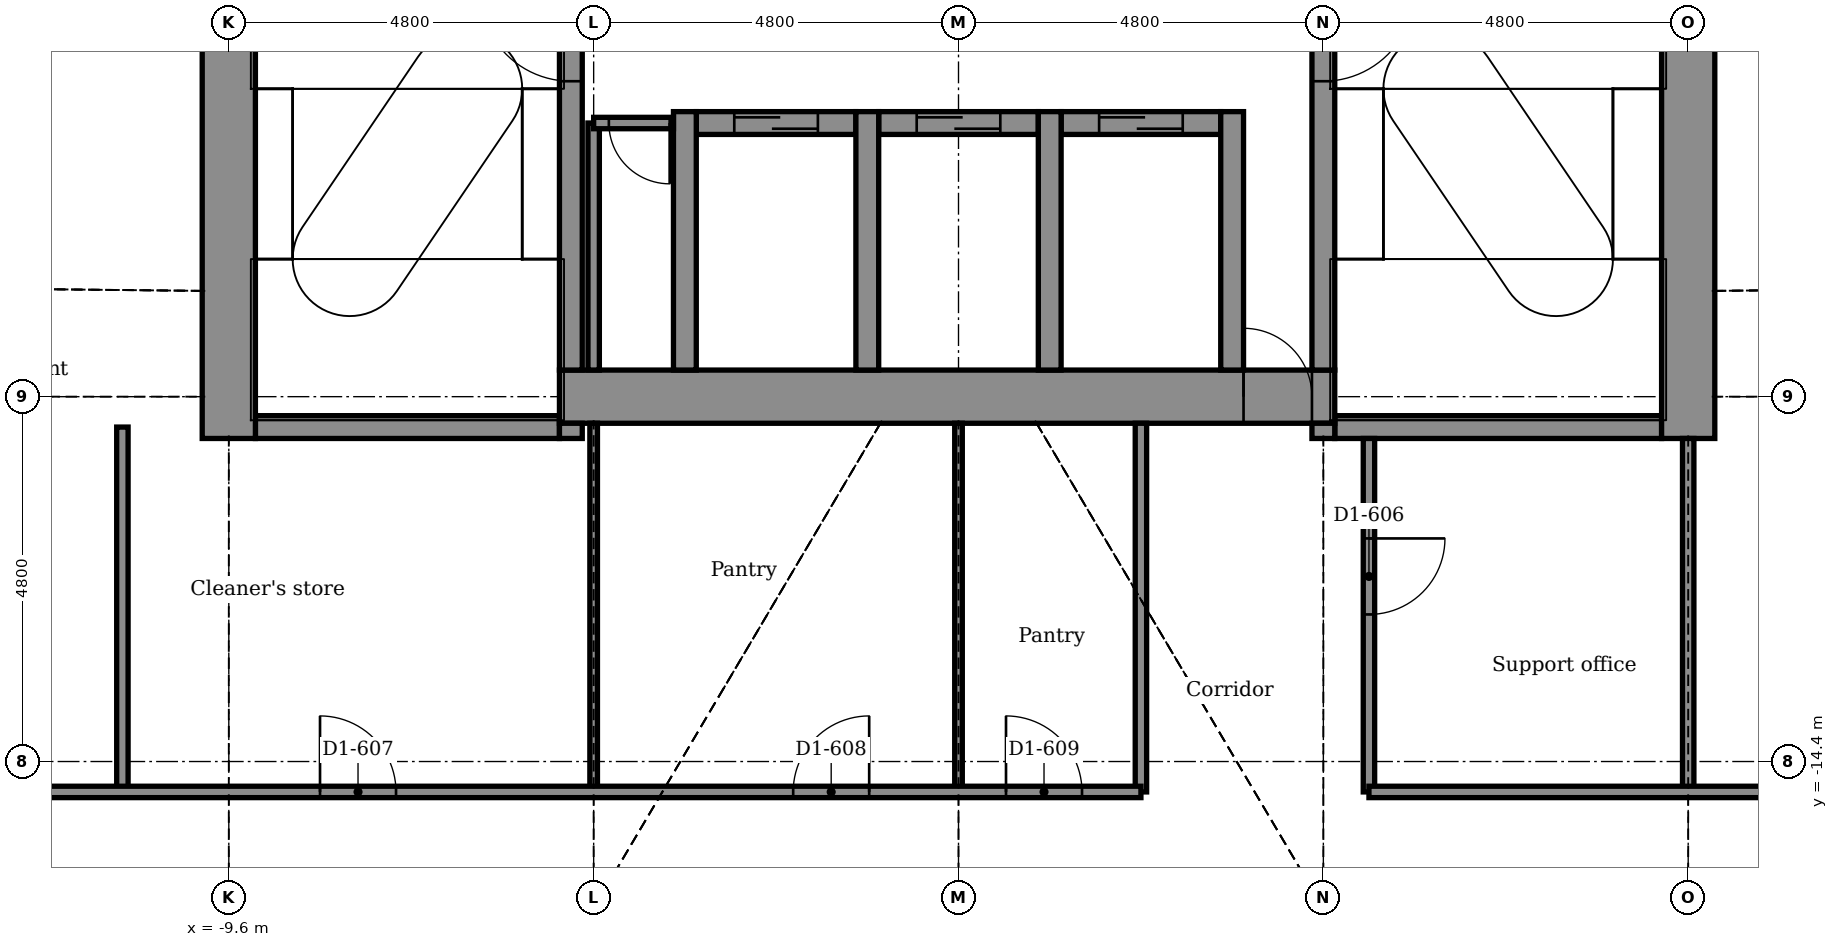
"""IFC4 building model, lengths in metres.
Left out: names, types, materials, properties, quantities, classifications, styles, units other than length and angle.
Written with IfcOpenShell. Run it as: python <this file> out.ifc"""

import sys

from ifc_helpers import new_model, si_unit, direction, frame, frame_2d, origin, place, context, subcontext, project, spatial, rectangle, extrude, element, fill, save


model = new_model("IFC4")
c1 = context("Model", 3, precision=1e-05, world=origin(), true_north=direction((0.0, 1.0)))
c2 = subcontext(c1, "Body", "Model", "MODEL_VIEW")
j1 = project(units=[si_unit("LENGTHUNIT", "METRE"), si_unit("PLANEANGLEUNIT", "RADIAN")], contexts=[c1])
p1 = place(None, origin())
s1 = spatial("IfcSite", under=j1, at=p1, CompositionType="ELEMENT")
p2 = place(p1, origin())
s2 = spatial("IfcBuilding", under=s1, at=p2, CompositionType="ELEMENT")
p3 = place(p2, frame((0.0, 0.0, 216.8)))
s3 = spatial("IfcBuildingStorey", under=s2, at=p3, CompositionType="ELEMENT", Elevation=216.8)
p4 = place(p3, frame((-9.25, -10.0, -0.3), z_axis=(0.0, 0.0, 1.0), x_axis=(1.0, 0.0, 0.0)))
e1 = element("IfcWall", 1, at=p4, inside=s3, PredefinedType="STANDARD", context=c2, shape_type="SweptSolid", body=[
    extrude(rectangle(XDim=4.0, YDim=0.3, at=frame_2d((2.0, 0.0))), origin(), (0.0, 0.0, 1.0), 6.15),
])
p5 = place(p3, frame((4.95, -10.0, -0.3), z_axis=(0.0, 0.0, 1.0), x_axis=(1.0, 0.0, 0.0)))
e2 = element("IfcWall", 2, at=p5, inside=s3, PredefinedType="STANDARD", context=c2, shape_type="SweptSolid", body=[
    extrude(rectangle(XDim=4.3, YDim=0.3, at=frame_2d((2.15, 0.0))), origin(), (0.0, 0.0, 1.0), 6.15),
])
p6 = place(p3, frame((-5.25, -9.6, -0.3), z_axis=(0.0, 0.0, 1.0), x_axis=(1.0, 0.0, 0.0)))
e3 = element("IfcWall", 3, at=p6, inside=s3, PredefinedType="SHEAR", context=c2, shape_type="SweptSolid", body=[
    extrude(rectangle(XDim=10.2, YDim=0.7, at=frame_2d((5.1, 0.0))), origin(), (0.0, 0.0, 1.0), 6.15),
])
p7 = place(p6, frame((9.0, 0.0, 0.3)))
e4 = element("IfcOpeningElement", 4, at=p7, cuts=e3, PredefinedType="OPENING", context=c2, shape_type="SweptSolid", body=[
    extrude(rectangle(XDim=0.9, YDim=2.1, at=frame_2d((0.45, 1.05))), frame((0.0, 0.36, 0.0), z_axis=(0.0, -1.0, 0.0), x_axis=(1.0, 0.0, 0.0)), (0.0, 0.0, 1.0), 0.72),
])
p8 = place(p3, frame((-3.45, -6.0, -0.3), z_axis=(0.0, 0.0, 1.0), x_axis=(1.0, 0.0, 0.0)))
e5 = element("IfcWall", 5, at=p8, inside=s3, PredefinedType="STANDARD", context=c2, shape_type="SweptSolid", body=[
    extrude(rectangle(XDim=2.1, YDim=0.3, at=frame_2d((1.05, 0.0))), origin(), (0.0, 0.0, 1.0), 6.15),
])
p9 = place(p8, frame((0.5, 0.0, 0.3)))
e6 = element("IfcOpeningElement", 6, at=p9, cuts=e5, PredefinedType="OPENING", context=c2, shape_type="SweptSolid", body=[
    extrude(rectangle(XDim=1.1, YDim=2.1, at=frame_2d((0.55, 1.05))), frame((0.0, 0.16, 0.0), z_axis=(0.0, -1.0, 0.0), x_axis=(1.0, 0.0, 0.0)), (0.0, 0.0, 1.0), 0.32),
])
p10 = place(p3, frame((-1.05, -6.0, -0.3), z_axis=(0.0, 0.0, 1.0), x_axis=(1.0, 0.0, 0.0)))
e7 = element("IfcWall", 7, at=p10, inside=s3, PredefinedType="STANDARD", context=c2, shape_type="SweptSolid", body=[
    extrude(rectangle(XDim=2.1, YDim=0.3, at=frame_2d((1.05, 0.0))), origin(), (0.0, 0.0, 1.0), 6.15),
])
p11 = place(p10, frame((0.5, 0.0, 0.3)))
e8 = element("IfcOpeningElement", 8, at=p11, cuts=e7, PredefinedType="OPENING", context=c2, shape_type="SweptSolid", body=[
    extrude(rectangle(XDim=1.1, YDim=2.1, at=frame_2d((0.55, 1.05))), frame((0.0, 0.16, 0.0), z_axis=(0.0, -1.0, 0.0), x_axis=(1.0, 0.0, 0.0)), (0.0, 0.0, 1.0), 0.32),
])
p12 = place(p3, frame((1.35, -6.0, -0.3), z_axis=(0.0, 0.0, 1.0), x_axis=(1.0, 0.0, 0.0)))
e9 = element("IfcWall", 9, at=p12, inside=s3, PredefinedType="STANDARD", context=c2, shape_type="SweptSolid", body=[
    extrude(rectangle(XDim=2.1, YDim=0.3, at=frame_2d((1.05, 0.0))), origin(), (0.0, 0.0, 1.0), 6.15),
])
p13 = place(p12, frame((0.5, 0.0, 0.3)))
e10 = element("IfcOpeningElement", 10, at=p13, cuts=e9, PredefinedType="OPENING", context=c2, shape_type="SweptSolid", body=[
    extrude(rectangle(XDim=1.1, YDim=2.1, at=frame_2d((0.55, 1.05))), frame((0.0, 0.16, 0.0), z_axis=(0.0, -1.0, 0.0), x_axis=(1.0, 0.0, 0.0)), (0.0, 0.0, 1.0), 0.32),
])
p14 = place(p3, frame((-9.6, -10.15, -0.3), z_axis=(0.0, 0.0, 1.0), x_axis=(0.0, 1.0, 0.0)))
e11 = element("IfcWall", 11, at=p14, inside=s3, PredefinedType="SHEAR", context=c2, shape_type="SweptSolid", body=[
    extrude(rectangle(XDim=7.6, YDim=0.7, at=frame_2d((3.8, 0.0))), origin(), (0.0, 0.0, 1.0), 6.15),
])
p15 = place(p3, frame((-5.1, -10.15, -0.3), z_axis=(0.0, 0.0, 1.0), x_axis=(0.0, 1.0, 0.0)))
e12 = element("IfcWall", 12, at=p15, inside=s3, PredefinedType="STANDARD", context=c2, shape_type="SweptSolid", body=[
    extrude(rectangle(XDim=0.2, YDim=0.3, at=frame_2d((0.1, 0.0))), origin(), (0.0, 0.0, 1.0), 6.15),
])
p16 = place(p3, frame((-5.1, -9.25, -0.3), z_axis=(0.0, 0.0, 1.0), x_axis=(0.0, 1.0, 0.0)))
e13 = element("IfcWall", 13, at=p16, inside=s3, PredefinedType="STANDARD", context=c2, shape_type="SweptSolid", body=[
    extrude(rectangle(XDim=7.0, YDim=0.3, at=frame_2d((3.5, 0.0))), origin(), (0.0, 0.0, 1.0), 6.15),
])
p17 = place(p16, frame((3.8, 0.0, 0.3)))
e14 = element("IfcOpeningElement", 14, at=p17, cuts=e13, PredefinedType="OPENING", context=c2, shape_type="SweptSolid", body=[
    extrude(rectangle(XDim=1.2, YDim=2.1, at=frame_2d((0.6, 1.05))), frame((0.0, 0.16, 0.0), z_axis=(0.0, -1.0, 0.0), x_axis=(1.0, 0.0, 0.0)), (0.0, 0.0, 1.0), 0.32),
])
for number, where, z_axis, x_axis in (
    (15, (-3.6, -9.25, -0.3), (0.0, 0.0, 1.0), (0.0, 1.0, 0.0)),
    (16, (-1.2, -9.25, -0.3), (0.0, 0.0, 1.0), (0.0, 1.0, 0.0)),
    (17, (1.2, -9.25, -0.3), (0.0, 0.0, 1.0), (0.0, 1.0, 0.0)),
    (18, (3.6, -9.25, -0.3), (0.0, 0.0, 1.0), (0.0, 1.0, 0.0)),
):
    element("IfcWall", number, at=place(p3, frame(where, z_axis=z_axis, x_axis=x_axis)), inside=s3, PredefinedType="STANDARD", context=c2, shape_type="SweptSolid", body=[
        extrude(rectangle(XDim=3.4, YDim=0.3, at=frame_2d((1.7, 0.0))), origin(), (0.0, 0.0, 1.0), 6.15),
    ])
p18 = place(p3, frame((4.8, -10.15, -0.3), z_axis=(0.0, 0.0, 1.0), x_axis=(0.0, 1.0, 0.0)))
e19 = element("IfcWall", 19, at=p18, inside=s3, PredefinedType="STANDARD", context=c2, shape_type="SweptSolid", body=[
    extrude(rectangle(XDim=0.2, YDim=0.3, at=frame_2d((0.1, 0.0))), origin(), (0.0, 0.0, 1.0), 6.15),
])
p19 = place(p3, frame((4.8, -9.25, -0.3), z_axis=(0.0, 0.0, 1.0), x_axis=(0.0, 1.0, 0.0)))
e20 = element("IfcWall", 20, at=p19, inside=s3, PredefinedType="STANDARD", context=c2, shape_type="SweptSolid", body=[
    extrude(rectangle(XDim=7.0, YDim=0.3, at=frame_2d((3.5, 0.0))), origin(), (0.0, 0.0, 1.0), 6.15),
])
p20 = place(p19, frame((3.8, 0.0, 0.3)))
e21 = element("IfcOpeningElement", 21, at=p20, cuts=e20, PredefinedType="OPENING", context=c2, shape_type="SweptSolid", body=[
    extrude(rectangle(XDim=1.2, YDim=2.1, at=frame_2d((0.6, 1.05))), frame((0.0, 0.16, 0.0), z_axis=(0.0, -1.0, 0.0), x_axis=(1.0, 0.0, 0.0)), (0.0, 0.0, 1.0), 0.32),
])
p21 = place(p3, frame((9.6, -10.15, -0.3), z_axis=(0.0, 0.0, 1.0), x_axis=(0.0, 1.0, 0.0)))
e22 = element("IfcWall", 22, at=p21, inside=s3, PredefinedType="SHEAR", context=c2, shape_type="SweptSolid", body=[
    extrude(rectangle(XDim=20.1, YDim=0.7, at=frame_2d((10.05, 0.0))), origin(), (0.0, 0.0, 1.0), 6.15),
])
p22 = place(p3, frame((9.6, -14.8, 0.0), z_axis=(0.0, 0.0, 1.0), x_axis=(0.0, 1.0, 0.0)))
e23 = element("IfcWall", 23, at=p22, inside=s3, PredefinedType="PARTITIONING", context=c2, shape_type="SweptSolid", body=[
    extrude(rectangle(XDim=4.65, YDim=0.15, at=frame_2d((2.325, 0.0))), origin(), (0.0, 0.0, 1.0), 5.393),
])
p23 = place(p3, frame((5.4, -14.8, 0.0), z_axis=(0.0, 0.0, 1.0), x_axis=(0.0, 1.0, 0.0)))
e24 = element("IfcWall", 24, at=p23, inside=s3, PredefinedType="PARTITIONING", context=c2, shape_type="SweptSolid", body=[
    extrude(rectangle(XDim=4.65, YDim=0.15, at=frame_2d((2.325, 0.0))), origin(), (0.0, 0.0, 1.0), 5.85),
])
p24 = place(p23, frame((2.335, 0.0, 0.0)))
e25 = element("IfcOpeningElement", 25, at=p24, cuts=e24, PredefinedType="OPENING", context=c2, shape_type="SweptSolid", body=[
    extrude(rectangle(XDim=1.0, YDim=2.1, at=frame_2d((0.5, 1.05))), frame((0.0, 0.085, 0.0), z_axis=(0.0, -1.0, 0.0), x_axis=(1.0, 0.0, 0.0)), (0.0, 0.0, 1.0), 0.17),
])
p25 = place(p3, frame((2.4, -14.8, 0.0), z_axis=(0.0, 0.0, 1.0), x_axis=(0.0, 1.0, 0.0)))
e26 = element("IfcWall", 26, at=p25, inside=s3, PredefinedType="PARTITIONING", context=c2, shape_type="SweptSolid", body=[
    extrude(rectangle(XDim=4.85, YDim=0.15, at=frame_2d((2.425, 0.0))), origin(), (0.0, 0.0, 1.0), 5.85),
])
p26 = place(p3, frame((0.0, -14.8, 0.0), z_axis=(0.0, 0.0, 1.0), x_axis=(0.0, 1.0, 0.0)))
e27 = element("IfcWall", 27, at=p26, inside=s3, PredefinedType="PARTITIONING", context=c2, shape_type="SweptSolid", body=[
    extrude(rectangle(XDim=4.85, YDim=0.1, at=frame_2d((2.425, 0.0))), origin(), (0.0, 0.0, 1.0), 5.317),
])
p27 = place(p3, frame((-4.8, -14.8, 0.0), z_axis=(0.0, 0.0, 1.0), x_axis=(0.0, 1.0, 0.0)))
e28 = element("IfcWall", 28, at=p27, inside=s3, PredefinedType="PARTITIONING", context=c2, shape_type="SweptSolid", body=[
    extrude(rectangle(XDim=4.85, YDim=0.1, at=frame_2d((2.425, 0.0))), origin(), (0.0, 0.0, 1.0), 5.54),
])
p28 = place(p3, frame((-4.8, -9.25, 0.0), z_axis=(0.0, 0.0, 1.0), x_axis=(0.0, 1.0, 0.0)))
e29 = element("IfcWall", 29, at=p28, inside=s3, PredefinedType="PARTITIONING", context=c2, shape_type="SweptSolid", body=[
    extrude(rectangle(XDim=3.25, YDim=0.15, at=frame_2d((1.625, 0.0))), origin(), (0.0, 0.0, 1.0), 5.85),
])
p29 = place(p3, frame((-11.0, -14.8, 0.0), z_axis=(0.0, 0.0, 1.0), x_axis=(0.0, 1.0, 0.0)))
e30 = element("IfcWall", 30, at=p29, inside=s3, PredefinedType="PARTITIONING", context=c2, shape_type="SweptSolid", body=[
    extrude(rectangle(XDim=4.8, YDim=0.15, at=frame_2d((2.4, 0.0))), origin(), (0.0, 0.0, 1.0), 5.85),
])
p30 = place(p3, frame((-17.234, -14.8, 0.0), z_axis=(0.0, 0.0, 1.0), x_axis=(1.0, 0.0, 0.0)))
e31 = element("IfcWall", 31, at=p30, inside=s3, PredefinedType="PARTITIONING", context=c2, shape_type="SweptSolid", body=[
    extrude(rectangle(XDim=19.634, YDim=0.15, at=frame_2d((9.817, 0.0))), origin(), (0.0, 0.0, 1.0), 5.7),
])
p31 = place(p30, frame((8.834, 0.0, 0.0)))
e32 = element("IfcOpeningElement", 32, at=p31, cuts=e31, PredefinedType="OPENING", context=c2, shape_type="SweptSolid", body=[
    extrude(rectangle(XDim=1.0, YDim=2.1, at=frame_2d((0.5, 1.05))), frame((0.0, 0.085, 0.0), z_axis=(0.0, -1.0, 0.0), x_axis=(1.0, 0.0, 0.0)), (0.0, 0.0, 1.0), 0.17),
])
p32 = place(p30, frame((15.059, 0.0, 0.0)))
e33 = element("IfcOpeningElement", 33, at=p32, cuts=e31, PredefinedType="OPENING", context=c2, shape_type="SweptSolid", body=[
    extrude(rectangle(XDim=1.0, YDim=2.1, at=frame_2d((0.5, 1.05))), frame((0.0, 0.085, 0.0), z_axis=(0.0, -1.0, 0.0), x_axis=(1.0, 0.0, 0.0)), (0.0, 0.0, 1.0), 0.17),
])
p33 = place(p30, frame((17.859, 0.0, 0.0)))
e34 = element("IfcOpeningElement", 34, at=p33, cuts=e31, PredefinedType="OPENING", context=c2, shape_type="SweptSolid", body=[
    extrude(rectangle(XDim=1.0, YDim=2.1, at=frame_2d((0.5, 1.05))), frame((0.0, 0.085, 0.0), z_axis=(0.0, -1.0, 0.0), x_axis=(1.0, 0.0, 0.0)), (0.0, 0.0, 1.0), 0.17),
])
p34 = place(p30, frame((0.222, 0.0, 0.0)))
e35 = element("IfcOpeningElement", 35, at=p34, cuts=e31, PredefinedType="OPENING", context=c2, shape_type="SweptSolid", body=[
    extrude(rectangle(XDim=1.0, YDim=2.1, at=frame_2d((0.5, 1.05))), frame((0.0, 0.085, 0.0), z_axis=(0.0, -1.0, 0.0), x_axis=(1.0, 0.0, 0.0)), (0.0, 0.0, 1.0), 0.17),
])
p35 = place(p3, frame((5.4, -14.8, 0.0), z_axis=(0.0, 0.0, 1.0), x_axis=(1.0, 0.0, 0.0)))
e36 = element("IfcWall", 36, at=p35, inside=s3, PredefinedType="PARTITIONING", context=c2, shape_type="SweptSolid", body=[
    extrude(rectangle(XDim=11.834, YDim=0.15, at=frame_2d((5.917, 0.0))), origin(), (0.0, 0.0, 1.0), 5.7),
])
p36 = place(p35, frame((10.511, 0.0, 0.0)))
e37 = element("IfcOpeningElement", 37, at=p36, cuts=e36, PredefinedType="OPENING", context=c2, shape_type="SweptSolid", body=[
    extrude(rectangle(XDim=1.0, YDim=2.1, at=frame_2d((0.5, 1.05))), frame((0.0, 0.085, 0.0), z_axis=(0.0, -1.0, 0.0), x_axis=(1.0, 0.0, 0.0)), (0.0, 0.0, 1.0), 0.17),
])
p37 = place(p3, frame((-4.8, -6.0, 0.0), z_axis=(0.0, 0.0, 1.0), x_axis=(1.0, 0.0, 0.0)))
e38 = element("IfcWall", 38, at=p37, inside=s3, PredefinedType="PARTITIONING", context=c2, shape_type="SweptSolid", body=[
    extrude(rectangle(XDim=1.05, YDim=0.15, at=frame_2d((0.525, 0.0))), origin(), (0.0, 0.0, 1.0), 5.85),
])
p38 = place(p37, frame((0.2, 0.0, 0.0)))
e39 = element("IfcOpeningElement", 39, at=p38, cuts=e38, PredefinedType="OPENING", context=c2, shape_type="SweptSolid", body=[
    extrude(rectangle(XDim=0.8, YDim=2.1, at=frame_2d((0.4, 1.05))), frame((0.0, 0.085, 0.0), z_axis=(0.0, -1.0, 0.0), x_axis=(1.0, 0.0, 0.0)), (0.0, 0.0, 1.0), 0.17),
])
p39 = place(p38, frame((0.8, 0.0, 0.0), z_axis=(0.0, 0.0, 1.0), x_axis=(-1.0, 0.0, 0.0)))
e40 = element("IfcDoor", 40, at=p39, inside=s3, OperationType="SINGLE_SWING_RIGHT", PredefinedType="DOOR", context=c2, shape_type="SweptSolid", body=[
    extrude(rectangle(XDim=0.8, YDim=2.1, at=frame_2d((0.4, 1.05))), frame((0.0, 0.025, 0.0), z_axis=(0.0, -1.0, 0.0), x_axis=(1.0, 0.0, 0.0)), (0.0, 0.0, 1.0), 0.05),
])
fill(e39, e40)
p40 = place(p24, frame((1.0, 0.0, 0.0), z_axis=(0.0, 0.0, 1.0), x_axis=(-1.0, 0.0, 0.0)))
e41 = element("IfcDoor", 41, at=p40, inside=s3, OperationType="SINGLE_SWING_RIGHT", PredefinedType="DOOR", context=c2, shape_type="SweptSolid", body=[
    extrude(rectangle(XDim=1.0, YDim=2.1, at=frame_2d((0.5, 1.05))), frame((0.0, 0.025, 0.0), z_axis=(0.0, -1.0, 0.0), x_axis=(1.0, 0.0, 0.0)), (0.0, 0.0, 1.0), 0.05),
])
fill(e25, e41)
p41 = place(p31, origin())
e42 = element("IfcDoor", 42, at=p41, inside=s3, OperationType="SINGLE_SWING_LEFT", PredefinedType="DOOR", context=c2, shape_type="SweptSolid", body=[
    extrude(rectangle(XDim=1.0, YDim=2.1, at=frame_2d((0.5, 1.05))), frame((0.0, 0.025, 0.0), z_axis=(0.0, -1.0, 0.0), x_axis=(1.0, 0.0, 0.0)), (0.0, 0.0, 1.0), 0.05),
])
fill(e32, e42)
p42 = place(p32, origin())
e43 = element("IfcDoor", 43, at=p42, inside=s3, OperationType="SINGLE_SWING_RIGHT", PredefinedType="DOOR", context=c2, shape_type="SweptSolid", body=[
    extrude(rectangle(XDim=1.0, YDim=2.1, at=frame_2d((0.5, 1.05))), frame((0.0, 0.025, 0.0), z_axis=(0.0, -1.0, 0.0), x_axis=(1.0, 0.0, 0.0)), (0.0, 0.0, 1.0), 0.05),
])
fill(e33, e43)
p43 = place(p33, origin())
e44 = element("IfcDoor", 44, at=p43, inside=s3, OperationType="SINGLE_SWING_LEFT", PredefinedType="DOOR", context=c2, shape_type="SweptSolid", body=[
    extrude(rectangle(XDim=1.0, YDim=2.1, at=frame_2d((0.5, 1.05))), frame((0.0, 0.025, 0.0), z_axis=(0.0, -1.0, 0.0), x_axis=(1.0, 0.0, 0.0)), (0.0, 0.0, 1.0), 0.05),
])
fill(e34, e44)
p44 = place(p9, origin())
e45 = element("IfcDoor", 45, at=p44, inside=s3, OperationType="DOUBLE_DOOR_SLIDING", PredefinedType="DOOR", context=c2, shape_type="SweptSolid", body=[
    extrude(rectangle(XDim=1.1, YDim=2.1, at=frame_2d((0.55, 1.05))), frame((0.0, 0.025, 0.0), z_axis=(0.0, -1.0, 0.0), x_axis=(1.0, 0.0, 0.0)), (0.0, 0.0, 1.0), 0.05),
])
fill(e6, e45)
p45 = place(p11, origin())
e46 = element("IfcDoor", 46, at=p45, inside=s3, OperationType="DOUBLE_DOOR_SLIDING", PredefinedType="DOOR", context=c2, shape_type="SweptSolid", body=[
    extrude(rectangle(XDim=1.1, YDim=2.1, at=frame_2d((0.55, 1.05))), frame((0.0, 0.025, 0.0), z_axis=(0.0, -1.0, 0.0), x_axis=(1.0, 0.0, 0.0)), (0.0, 0.0, 1.0), 0.05),
])
fill(e8, e46)
p46 = place(p13, origin())
e47 = element("IfcDoor", 47, at=p46, inside=s3, OperationType="DOUBLE_DOOR_SLIDING", PredefinedType="DOOR", context=c2, shape_type="SweptSolid", body=[
    extrude(rectangle(XDim=1.1, YDim=2.1, at=frame_2d((0.55, 1.05))), frame((0.0, 0.025, 0.0), z_axis=(0.0, -1.0, 0.0), x_axis=(1.0, 0.0, 0.0)), (0.0, 0.0, 1.0), 0.05),
])
fill(e10, e47)
p47 = place(p17, origin())
e48 = element("IfcDoor", 48, at=p47, inside=s3, OperationType="SINGLE_SWING_RIGHT", PredefinedType="DOOR", context=c2, shape_type="SweptSolid", body=[
    extrude(rectangle(XDim=1.2, YDim=2.1, at=frame_2d((0.6, 1.05))), frame((0.0, 0.025, 0.0), z_axis=(0.0, -1.0, 0.0), x_axis=(1.0, 0.0, 0.0)), (0.0, 0.0, 1.0), 0.05),
])
fill(e14, e48)
p48 = place(p20, frame((1.2, 0.0, 0.0), z_axis=(0.0, 0.0, 1.0), x_axis=(-1.0, 0.0, 0.0)))
e49 = element("IfcDoor", 49, at=p48, inside=s3, OperationType="SINGLE_SWING_RIGHT", PredefinedType="DOOR", context=c2, shape_type="SweptSolid", body=[
    extrude(rectangle(XDim=1.2, YDim=2.1, at=frame_2d((0.6, 1.05))), frame((0.0, 0.025, 0.0), z_axis=(0.0, -1.0, 0.0), x_axis=(1.0, 0.0, 0.0)), (0.0, 0.0, 1.0), 0.05),
])
fill(e21, e49)
p49 = place(p7, origin())
e50 = element("IfcDoor", 50, at=p49, inside=s3, OperationType="SINGLE_SWING_LEFT", PredefinedType="DOOR", context=c2, shape_type="SweptSolid", body=[
    extrude(rectangle(XDim=0.9, YDim=2.1, at=frame_2d((0.45, 1.05))), frame((0.0, 0.025, 0.0), z_axis=(0.0, -1.0, 0.0), x_axis=(1.0, 0.0, 0.0)), (0.0, 0.0, 1.0), 0.05),
])
fill(e4, e50)
save(model, sys.argv[1])
